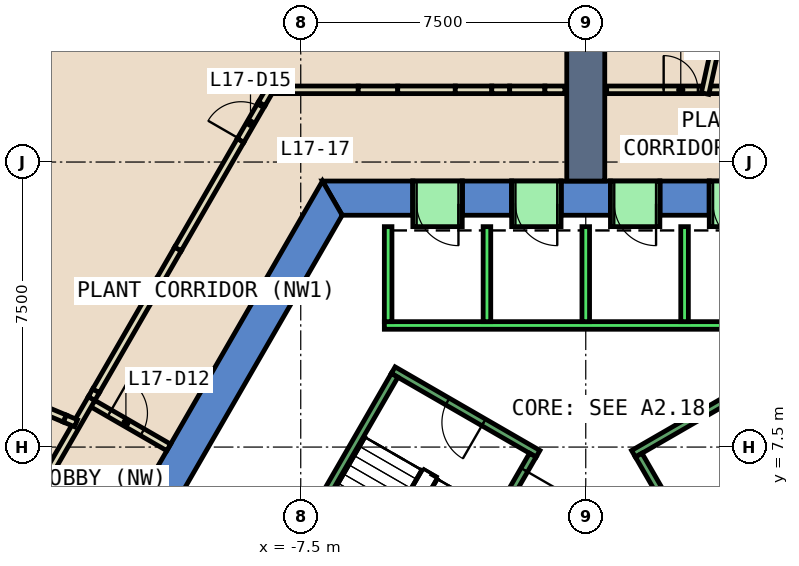
"""IFC4 building model, lengths in metres.
Left out: names, types, materials, properties, quantities, classifications, styles, units other than length and angle.
Written with IfcOpenShell. Run it as: python <this file> out.ifc"""

import sys

from ifc_helpers import new_model, si_unit, direction, frame, frame_2d, origin, place, context, subcontext, project, spatial, polyline, rectangle, outline, extrude, element, fill, save


model = new_model("IFC4")
c1 = context("Model", 3, precision=1e-05, world=origin(), true_north=direction((0.0, 1.0)))
c2 = subcontext(c1, "Body", "Model", "MODEL_VIEW")
j1 = project(units=[si_unit("LENGTHUNIT", "METRE"), si_unit("PLANEANGLEUNIT", "RADIAN")], contexts=[c1])
p1 = place(None, origin())
s1 = spatial("IfcSite", under=j1, at=p1, CompositionType="ELEMENT")
p2 = place(p1, origin())
s2 = spatial("IfcBuilding", under=s1, at=p2, CompositionType="ELEMENT")
p3 = place(p2, frame((0.0, 0.0, 81.2)))
s3 = spatial("IfcBuildingStorey", under=s2, at=p3, CompositionType="ELEMENT", Elevation=81.2)
p4 = place(p3, frame((0.0, 0.0, -0.6)))
e1 = element("IfcWall", 1, at=p4, inside=s3, PredefinedType="SHEAR", context=c2, shape_type="SweptSolid", body=[
    extrude(outline(polyline([(1.95, 14.5), (1.95, 13.6), (3.25, 13.6), (3.25, 14.5), (1.95, 14.5)])), origin(), (0.0, 0.0, 1.0), 5.4),
])
p5 = place(p3, frame((0.0, 0.0, -0.6)))
e2 = element("IfcWall", 2, at=p5, inside=s3, PredefinedType="SHEAR", context=c2, shape_type="SweptSolid", body=[
    extrude(outline(polyline([(-0.65, 14.5), (-0.65, 13.6), (0.65, 13.6), (0.65, 14.5), (-0.65, 14.5)])), origin(), (0.0, 0.0, 1.0), 5.4),
])
p6 = place(p3, frame((0.0, 0.0, -0.6)))
e3 = element("IfcWall", 3, at=p6, inside=s3, PredefinedType="SHEAR", context=c2, shape_type="SweptSolid", body=[
    extrude(outline(polyline([(-3.25, 14.5), (-3.25, 13.6), (-1.95, 13.6), (-1.95, 14.5), (-3.25, 14.5)])), origin(), (0.0, 0.0, 1.0), 5.4),
])
p7 = place(p3, frame((0.0, 0.0, -0.6)))
e4 = element("IfcWall", 4, at=p7, inside=s3, PredefinedType="SHEAR", context=c2, shape_type="SweptSolid", body=[
    extrude(outline(polyline([(-4.55, 13.6), (-4.55, 14.5), (-6.928, 14.5), (-6.409, 13.6), (-4.55, 13.6)])), origin(), (0.0, 0.0, 1.0), 5.4),
])
p8 = place(p3, frame((0.0, 0.0, 3.6)))
e5 = element("IfcWall", 5, at=p8, inside=s3, PredefinedType="SHEAR", context=c2, shape_type="SweptSolid", body=[
    extrude(outline(polyline([(3.25, 14.5), (3.25, 13.6), (4.55, 13.6), (4.55, 14.5), (3.25, 14.5)])), origin(), (0.0, 0.0, 1.0), 1.2),
])
p9 = place(p3, frame((0.0, 0.0, 3.6)))
e6 = element("IfcWall", 6, at=p9, inside=s3, PredefinedType="SHEAR", context=c2, shape_type="SweptSolid", body=[
    extrude(outline(polyline([(0.65, 14.5), (0.65, 13.6), (1.95, 13.6), (1.95, 14.5), (0.65, 14.5)])), origin(), (0.0, 0.0, 1.0), 1.2),
])
p10 = place(p3, frame((0.0, 0.0, 3.6)))
e7 = element("IfcWall", 7, at=p10, inside=s3, PredefinedType="SHEAR", context=c2, shape_type="SweptSolid", body=[
    extrude(outline(polyline([(-1.95, 14.5), (-1.95, 13.6), (-0.65, 13.6), (-0.65, 14.5), (-1.95, 14.5)])), origin(), (0.0, 0.0, 1.0), 1.2),
])
p11 = place(p3, frame((0.0, 0.0, 3.6)))
e8 = element("IfcWall", 8, at=p11, inside=s3, PredefinedType="SHEAR", context=c2, shape_type="SweptSolid", body=[
    extrude(outline(polyline([(-4.55, 14.5), (-4.55, 13.6), (-3.25, 13.6), (-3.25, 14.5), (-4.55, 14.5)])), origin(), (0.0, 0.0, 1.0), 1.2),
])
p12 = place(p3, frame((0.0, 0.0, -0.6)))
e9 = element("IfcWall", 9, at=p12, inside=s3, PredefinedType="SHEAR", context=c2, shape_type="SweptSolid", body=[
    extrude(outline(polyline([(-12.267, 5.252), (-11.488, 4.802), (-6.409, 13.6), (-6.928, 14.5), (-12.267, 5.252)])), origin(), (0.0, 0.0, 1.0), 5.4),
])
p13 = place(p3, frame((0.0, 14.5, 0.0), z_axis=(0.0, 0.0, 1.0), x_axis=(0.0, 1.0, 0.0)))
e10 = element("IfcWall", 10, at=p13, inside=s3, PredefinedType="SHEAR", context=c2, shape_type="SweptSolid", body=[
    extrude(rectangle(XDim=32.052, YDim=1.0, at=frame_2d((16.026, 0.0))), origin(), (0.0, 0.0, 1.0), 4.8),
])
p14 = place(p3, frame((3.26, 16.9, 0.0), z_axis=(0.0, 0.0, 1.0), x_axis=(1.0, 0.0, 0.0)))
e11 = element("IfcWall", 11, at=p14, inside=s3, PredefinedType="PARTITIONING", context=c2, shape_type="SweptSolid", body=[
    extrude(rectangle(XDim=3.281, YDim=0.2, at=frame_2d((1.641, 0.0))), origin(), (0.0, 0.0, 1.0), 4.8),
])
p15 = place(p14, frame((1.103, 0.0, 0.0)))
e12 = element("IfcOpeningElement", 12, at=p15, cuts=e11, PredefinedType="OPENING", context=c2, shape_type="SweptSolid", body=[
    extrude(rectangle(XDim=1.0, YDim=2.1, at=frame_2d((0.5, 1.05))), frame((0.0, 0.11, 0.0), z_axis=(0.0, -1.0, 0.0), x_axis=(1.0, 0.0, 0.0)), (0.0, 0.0, 1.0), 0.22),
])
p16 = place(p3, frame((0.55, 16.9, 0.0), z_axis=(0.0, 0.0, 1.0), x_axis=(1.0, 0.0, 0.0)))
e13 = element("IfcWall", 13, at=p16, inside=s3, PredefinedType="PARTITIONING", context=c2, shape_type="SweptSolid", body=[
    extrude(rectangle(XDim=2.51, YDim=0.2, at=frame_2d((1.255, 0.0))), origin(), (0.0, 0.0, 1.0), 4.8),
])
p17 = place(p16, frame((1.5, 0.0, 0.0)))
e14 = element("IfcOpeningElement", 14, at=p17, cuts=e13, PredefinedType="OPENING", context=c2, shape_type="SweptSolid", body=[
    extrude(rectangle(XDim=0.9, YDim=2.1, at=frame_2d((0.45, 1.05))), frame((0.0, 0.11, 0.0), z_axis=(0.0, -1.0, 0.0), x_axis=(1.0, 0.0, 0.0)), (0.0, 0.0, 1.0), 0.22),
])
p18 = place(p3, frame((3.139, 16.802, 0.0), z_axis=(0.0, 0.0, 1.0), x_axis=(0.214360085787, 0.97675470494, 0.0)))
e15 = element("IfcWall", 15, at=p18, inside=s3, PredefinedType="PARTITIONING", context=c2, shape_type="SweptSolid", body=[
    extrude(rectangle(XDim=25.271, YDim=0.2, at=frame_2d((12.635, 0.0))), origin(), (0.0, 0.0, 1.0), 2.3),
])
p19 = place(p3, frame((-13.053, 8.691, 0.0), z_axis=(0.0, 0.0, 1.0), x_axis=(0.865973769406, -0.500089422704, 0.0)))
e16 = element("IfcWall", 16, at=p19, inside=s3, PredefinedType="PARTITIONING", context=c2, shape_type="SweptSolid", body=[
    extrude(rectangle(XDim=2.399, YDim=0.2, at=frame_2d((1.2, 0.0))), origin(), (0.0, 0.0, 1.0), 2.4),
])
p20 = place(p19, frame((0.6, 0.0, 0.0)))
e17 = element("IfcOpeningElement", 17, at=p20, cuts=e16, PredefinedType="OPENING", context=c2, shape_type="SweptSolid", body=[
    extrude(rectangle(XDim=1.0, YDim=2.1, at=frame_2d((0.5, 1.05))), frame((0.0, 0.11, 0.0), z_axis=(0.0, -1.0, 0.0), x_axis=(1.0, 0.0, 0.0)), (0.0, 0.0, 1.0), 0.22),
])
p21 = place(p3, frame((-16.603, 2.542, 0.0), z_axis=(0.0, 0.0, 1.0), x_axis=(0.499968011863, 0.866043871356, 0.0)))
e18 = element("IfcWall", 18, at=p21, inside=s3, PredefinedType="PARTITIONING", context=c2, shape_type="SweptSolid", body=[
    extrude(rectangle(XDim=7.201, YDim=0.2, at=frame_2d((3.6, 0.0))), origin(), (0.0, 0.0, 1.0), 4.8),
])
p22 = place(p21, frame((2.654, 0.0, 0.0)))
e19 = element("IfcOpeningElement", 19, at=p22, cuts=e18, PredefinedType="OPENING", context=c2, shape_type="SweptSolid", body=[
    extrude(rectangle(XDim=1.0, YDim=2.1, at=frame_2d((0.5, 1.05))), frame((0.0, 0.11, 0.0), z_axis=(0.0, -1.0, 0.0), x_axis=(1.0, 0.0, 0.0)), (0.0, 0.0, 1.0), 0.22),
])
p23 = place(p3, frame((-13.003, 8.778, 0.0), z_axis=(0.0, 0.0, 1.0), x_axis=(0.49939147885, 0.866376448694, 0.0)))
e20 = element("IfcWall", 20, at=p23, inside=s3, PredefinedType="PARTITIONING", context=c2, shape_type="SweptSolid", body=[
    extrude(rectangle(XDim=0.234, YDim=0.2, at=frame_2d((0.117, 0.0))), origin(), (0.0, 0.0, 1.0), 2.4),
])
p24 = place(p3, frame((-8.214, 16.9, 0.0), z_axis=(0.0, 0.0, 1.0), x_axis=(1.0, 0.0, 0.0)))
e21 = element("IfcWall", 21, at=p24, inside=s3, PredefinedType="PARTITIONING", context=c2, shape_type="SweptSolid", body=[
    extrude(rectangle(XDim=2.227, YDim=0.2, at=frame_2d((1.114, 0.0))), origin(), (0.0, 0.0, 1.0), 4.8),
])
p25 = place(p3, frame((-12.886, 8.981, 0.0), z_axis=(0.0, 0.0, 1.0), x_axis=(0.500018952895, 0.866014461049, 0.0)))
e22 = element("IfcWall", 22, at=p25, inside=s3, PredefinedType="PARTITIONING", context=c2, shape_type="SweptSolid", body=[
    extrude(rectangle(XDim=3.35, YDim=0.2, at=frame_2d((1.675, 0.0))), origin(), (0.0, 0.0, 1.0), 4.8),
])
p26 = place(p3, frame((-11.211, 11.882, 0.0), z_axis=(0.0, 0.0, 1.0), x_axis=(0.499693115345, 0.866202511239, 0.0)))
e23 = element("IfcWall", 23, at=p26, inside=s3, PredefinedType="PARTITIONING", context=c2, shape_type="SweptSolid", body=[
    extrude(rectangle(XDim=0.96, YDim=0.2, at=frame_2d((0.48, 0.0))), origin(), (0.0, 0.0, 1.0), 2.4),
])
p27 = place(p3, frame((-10.731, 12.714, 0.0), z_axis=(0.0, 0.0, 1.0), x_axis=(0.500043078269, 0.866000531106, 0.0)))
e24 = element("IfcWall", 24, at=p27, inside=s3, PredefinedType="PARTITIONING", context=c2, shape_type="SweptSolid", body=[
    extrude(rectangle(XDim=3.296, YDim=0.2, at=frame_2d((1.648, 0.0))), origin(), (0.0, 0.0, 1.0), 4.8),
])
p28 = place(p3, frame((-9.083, 15.568, 0.0), z_axis=(0.0, 0.0, 1.0), x_axis=(0.499988560547, 0.866032008255, 0.0)))
e25 = element("IfcWall", 25, at=p28, inside=s3, PredefinedType="PARTITIONING", context=c2, shape_type="SweptSolid", body=[
    extrude(rectangle(XDim=1.112, YDim=0.2, at=frame_2d((0.556, 0.0))), origin(), (0.0, 0.0, 1.0), 2.4),
])
p29 = place(p28, frame((0.022, 0.0, 0.0)))
e26 = element("IfcOpeningElement", 26, at=p29, cuts=e25, PredefinedType="OPENING", context=c2, shape_type="SweptSolid", body=[
    extrude(rectangle(XDim=1.0, YDim=2.1, at=frame_2d((0.5, 1.05))), frame((0.0, 0.11, 0.0), z_axis=(0.0, -1.0, 0.0), x_axis=(1.0, 0.0, 0.0)), (0.0, 0.0, 1.0), 0.22),
])
p30 = place(p3, frame((-8.527, 16.531, 0.0), z_axis=(0.0, 0.0, 1.0), x_axis=(0.499829488579, 0.86612382622, 0.0)))
e27 = element("IfcWall", 27, at=p30, inside=s3, PredefinedType="PARTITIONING", context=c2, shape_type="SweptSolid", body=[
    extrude(rectangle(XDim=0.527, YDim=0.2, at=frame_2d((0.263, 0.0))), origin(), (0.0, 0.0, 1.0), 4.8),
])
p31 = place(p3, frame((-5.987, 16.9, 0.0), z_axis=(0.0, 0.0, 1.0), x_axis=(1.0, 0.0, 0.0)))
e28 = element("IfcWall", 28, at=p31, inside=s3, PredefinedType="PARTITIONING", context=c2, shape_type="SweptSolid", body=[
    extrude(rectangle(XDim=1.039, YDim=0.2, at=frame_2d((0.52, 0.0))), origin(), (0.0, 0.0, 1.0), 2.4),
])
p32 = place(p3, frame((-4.948, 16.9, 0.0), z_axis=(0.0, 0.0, 1.0), x_axis=(1.0, 0.0, 0.0)))
e29 = element("IfcWall", 29, at=p32, inside=s3, PredefinedType="PARTITIONING", context=c2, shape_type="SweptSolid", body=[
    extrude(rectangle(XDim=1.515, YDim=0.2, at=frame_2d((0.757, 0.0))), origin(), (0.0, 0.0, 1.0), 4.8),
])
p33 = place(p3, frame((-3.433, 16.9, 0.0), z_axis=(0.0, 0.0, 1.0), x_axis=(1.0, 0.0, 0.0)))
e30 = element("IfcWall", 30, at=p33, inside=s3, PredefinedType="PARTITIONING", context=c2, shape_type="SweptSolid", body=[
    extrude(rectangle(XDim=0.96, YDim=0.2, at=frame_2d((0.48, 0.0))), origin(), (0.0, 0.0, 1.0), 2.3),
])
p34 = place(p3, frame((-2.473, 16.9, 0.0), z_axis=(0.0, 0.0, 1.0), x_axis=(1.0, 0.0, 0.0)))
e31 = element("IfcWall", 31, at=p34, inside=s3, PredefinedType="PARTITIONING", context=c2, shape_type="SweptSolid", body=[
    extrude(rectangle(XDim=0.471, YDim=0.2, at=frame_2d((0.235, 0.0))), origin(), (0.0, 0.0, 1.0), 4.8),
])
p35 = place(p3, frame((-2.002, 16.9, 0.0), z_axis=(0.0, 0.0, 1.0), x_axis=(1.0, 0.0, 0.0)))
e32 = element("IfcWall", 32, at=p35, inside=s3, PredefinedType="PARTITIONING", context=c2, shape_type="SweptSolid", body=[
    extrude(rectangle(XDim=0.927, YDim=0.2, at=frame_2d((0.463, 0.0))), origin(), (0.0, 0.0, 1.0), 2.0),
])
p36 = place(p3, frame((-1.075, 16.9, 0.0), z_axis=(0.0, 0.0, 1.0), x_axis=(1.0, 0.0, 0.0)))
e33 = element("IfcWall", 33, at=p36, inside=s3, PredefinedType="PARTITIONING", context=c2, shape_type="SweptSolid", body=[
    extrude(rectangle(XDim=0.525, YDim=0.2, at=frame_2d((0.262, 0.0))), origin(), (0.0, 0.0, 1.0), 4.8),
])
p37 = place(p3, frame((-25.73, 13.293, 0.0), z_axis=(0.0, 0.0, 1.0), x_axis=(0.922164650021, -0.386797567535, 0.0)))
e34 = element("IfcWall", 34, at=p37, inside=s3, PredefinedType="PARTITIONING", context=c2, shape_type="SweptSolid", body=[
    extrude(rectangle(XDim=13.038, YDim=0.2, at=frame_2d((6.519, 0.0))), origin(), (0.0, 0.0, 1.0), 4.8),
])
p38 = place(p3, frame((-13.707, 8.25, 0.0), z_axis=(0.0, 0.0, 1.0), x_axis=(0.921982105607, -0.387232484355, 0.0)))
e35 = element("IfcWall", 35, at=p38, inside=s3, PredefinedType="PARTITIONING", context=c2, shape_type="SweptSolid", body=[
    extrude(rectangle(XDim=0.318, YDim=0.2, at=frame_2d((0.159, 0.0))), origin(), (0.0, 0.0, 1.0), 2.4),
])
p39 = place(p3, frame((5.3, 10.7, 0.0), z_axis=(0.0, 0.0, 1.0), x_axis=(-1.0, 0.0, 0.0)))
e36 = element("IfcWall", 36, at=p39, inside=s3, PredefinedType="STANDARD", context=c2, shape_type="SweptSolid", body=[
    extrude(rectangle(XDim=10.6, YDim=0.2, at=frame_2d((5.3, 0.0))), origin(), (0.0, 0.0, 1.0), 4.8),
])
for number, where, z_axis, x_axis in (
    (37, (2.6, 10.8, 0.0), (0.0, 0.0, 1.0), (0.0, 1.0, 0.0)),
    (38, (0.0, 10.8, 0.0), (0.0, 0.0, 1.0), (0.0, 1.0, 0.0)),
    (39, (-2.6, 10.8, 0.0), (0.0, 0.0, 1.0), (0.0, 1.0, 0.0)),
    (40, (-5.2, 10.8, 0.0), (0.0, 0.0, 1.0), (0.0, 1.0, 0.0)),
):
    element("IfcWall", number, at=place(p3, frame(where, z_axis=z_axis, x_axis=x_axis)), inside=s3, PredefinedType="STANDARD", context=c2, shape_type="SweptSolid", body=[
        extrude(rectangle(XDim=2.5, YDim=0.2, at=frame_2d((1.25, 0.0))), origin(), (0.0, 0.0, 1.0), 4.8),
    ])
p40 = place(p3, frame((4.55, 13.9, 0.0), z_axis=(0.0, 0.0, 1.0), x_axis=(-1.0, 0.0, 0.0)))
e41 = element("IfcWall", 41, at=p40, inside=s3, PredefinedType="STANDARD", context=c2, shape_type="SweptSolid", body=[
    extrude(rectangle(XDim=1.3, YDim=1.2, at=frame_2d((0.65, 0.0))), origin(), (0.0, 0.0, 1.0), 2.4),
])
p41 = place(p40, frame((0.1, 0.0, 0.0)))
e42 = element("IfcOpeningElement", 42, at=p41, cuts=e41, PredefinedType="OPENING", context=c2, shape_type="SweptSolid", body=[
    extrude(rectangle(XDim=1.1, YDim=2.3, at=frame_2d((0.55, 1.15))), frame((0.0, 0.61, 0.0), z_axis=(0.0, -1.0, 0.0), x_axis=(1.0, 0.0, 0.0)), (0.0, 0.0, 1.0), 1.22),
])
p42 = place(p3, frame((1.95, 13.9, 0.0), z_axis=(0.0, 0.0, 1.0), x_axis=(-1.0, 0.0, 0.0)))
e43 = element("IfcWall", 43, at=p42, inside=s3, PredefinedType="STANDARD", context=c2, shape_type="SweptSolid", body=[
    extrude(rectangle(XDim=1.3, YDim=1.2, at=frame_2d((0.65, 0.0))), origin(), (0.0, 0.0, 1.0), 2.4),
])
p43 = place(p42, frame((0.1, 0.0, 0.0)))
e44 = element("IfcOpeningElement", 44, at=p43, cuts=e43, PredefinedType="OPENING", context=c2, shape_type="SweptSolid", body=[
    extrude(rectangle(XDim=1.1, YDim=2.3, at=frame_2d((0.55, 1.15))), frame((0.0, 0.61, 0.0), z_axis=(0.0, -1.0, 0.0), x_axis=(1.0, 0.0, 0.0)), (0.0, 0.0, 1.0), 1.22),
])
p44 = place(p3, frame((-0.65, 13.9, 0.0), z_axis=(0.0, 0.0, 1.0), x_axis=(-1.0, 0.0, 0.0)))
e45 = element("IfcWall", 45, at=p44, inside=s3, PredefinedType="STANDARD", context=c2, shape_type="SweptSolid", body=[
    extrude(rectangle(XDim=1.3, YDim=1.2, at=frame_2d((0.65, 0.0))), origin(), (0.0, 0.0, 1.0), 2.4),
])
p45 = place(p44, frame((0.1, 0.0, 0.0)))
e46 = element("IfcOpeningElement", 46, at=p45, cuts=e45, PredefinedType="OPENING", context=c2, shape_type="SweptSolid", body=[
    extrude(rectangle(XDim=1.1, YDim=2.3, at=frame_2d((0.55, 1.15))), frame((0.0, 0.61, 0.0), z_axis=(0.0, -1.0, 0.0), x_axis=(1.0, 0.0, 0.0)), (0.0, 0.0, 1.0), 1.22),
])
p46 = place(p3, frame((-3.25, 13.9, 0.0), z_axis=(0.0, 0.0, 1.0), x_axis=(-1.0, 0.0, 0.0)))
e47 = element("IfcWall", 47, at=p46, inside=s3, PredefinedType="STANDARD", context=c2, shape_type="SweptSolid", body=[
    extrude(rectangle(XDim=1.3, YDim=1.2, at=frame_2d((0.65, 0.0))), origin(), (0.0, 0.0, 1.0), 2.4),
])
p47 = place(p46, frame((0.1, 0.0, 0.0)))
e48 = element("IfcOpeningElement", 48, at=p47, cuts=e47, PredefinedType="OPENING", context=c2, shape_type="SweptSolid", body=[
    extrude(rectangle(XDim=1.1, YDim=2.3, at=frame_2d((0.55, 1.15))), frame((0.0, 0.61, 0.0), z_axis=(0.0, -1.0, 0.0), x_axis=(1.0, 0.0, 0.0)), (0.0, 0.0, 1.0), 1.22),
])
p48 = place(p3, frame((1.256, 7.324, 0.0), z_axis=(0.0, 0.0, 1.0), x_axis=(0.866046073146, 0.499964197906, 0.0)))
e49 = element("IfcWall", 49, at=p48, inside=s3, PredefinedType="STANDARD", context=c2, shape_type="SweptSolid", body=[
    extrude(rectangle(XDim=4.4, YDim=0.2, at=frame_2d((2.2, 0.0))), origin(), (0.0, 0.0, 1.0), 4.8),
])
p49 = place(p3, frame((4.843, 1.312, 0.0), z_axis=(0.0, 0.0, 1.0), x_axis=(-0.499963383562, 0.866046543262, 0.0)))
e50 = element("IfcWall", 50, at=p49, inside=s3, PredefinedType="STANDARD", context=c2, shape_type="SweptSolid", body=[
    extrude(rectangle(XDim=6.9, YDim=0.2, at=frame_2d((3.45, 0.0))), origin(), (0.0, 0.0, 1.0), 4.8),
])
p50 = place(p49, frame((0.45, 0.0, 0.0)))
e51 = element("IfcOpeningElement", 51, at=p50, cuts=e50, PredefinedType="OPENING", context=c2, shape_type="SweptSolid", body=[
    extrude(rectangle(XDim=1.1, YDim=2.2, at=frame_2d((0.55, 1.1))), frame((0.0, 0.11, 0.0), z_axis=(0.0, -1.0, 0.0), x_axis=(1.0, 0.0, 0.0)), (0.0, 0.0, 1.0), 0.22),
])
p51 = place(p3, frame((-1.256, 7.324, 0.0), z_axis=(0.0, 0.0, 1.0), x_axis=(-0.866046073146, 0.499964197906, 0.0)))
e52 = element("IfcWall", 52, at=p51, inside=s3, PredefinedType="STANDARD", context=c2, shape_type="SweptSolid", body=[
    extrude(rectangle(XDim=4.4, YDim=0.2, at=frame_2d((2.2, 0.0))), origin(), (0.0, 0.0, 1.0), 4.8),
])
p52 = place(p51, frame((1.65, 0.0, 0.0)))
e53 = element("IfcOpeningElement", 53, at=p52, cuts=e52, PredefinedType="OPENING", context=c2, shape_type="SweptSolid", body=[
    extrude(rectangle(XDim=1.1, YDim=2.2, at=frame_2d((0.55, 1.1))), frame((0.0, 0.11, 0.0), z_axis=(0.0, -1.0, 0.0), x_axis=(1.0, 0.0, 0.0)), (0.0, 0.0, 1.0), 0.22),
])
p53 = place(p3, frame((-1.393, 7.288, 0.0), z_axis=(0.0, 0.0, 1.0), x_axis=(-0.499963383562, -0.866046543262, 0.0)))
e54 = element("IfcWall", 54, at=p53, inside=s3, PredefinedType="STANDARD", context=c2, shape_type="SweptSolid", body=[
    extrude(rectangle(XDim=6.9, YDim=0.2, at=frame_2d((3.45, 0.0))), origin(), (0.0, 0.0, 1.0), 4.8),
])
p54 = place(p53, frame((0.45, 0.0, 0.0)))
e55 = element("IfcOpeningElement", 55, at=p54, cuts=e54, PredefinedType="OPENING", context=c2, shape_type="SweptSolid", body=[
    extrude(rectangle(XDim=1.1, YDim=2.2, at=frame_2d((0.55, 1.1))), frame((0.0, 0.11, 0.0), z_axis=(0.0, -1.0, 0.0), x_axis=(1.0, 0.0, 0.0)), (0.0, 0.0, 1.0), 0.22),
])
p55 = place(p3, frame((-5.03, 9.388, 0.0), z_axis=(0.0, 0.0, 1.0), x_axis=(-0.499978703459, -0.866037698999, 0.0)))
e56 = element("IfcWall", 56, at=p55, inside=s3, PredefinedType="STANDARD", context=c2, shape_type="SweptSolid", body=[
    extrude(rectangle(XDim=6.9, YDim=0.2, at=frame_2d((3.45, 0.0))), origin(), (0.0, 0.0, 1.0), 4.8),
])
p56 = place(p17, origin())
e57 = element("IfcDoor", 57, at=p56, inside=s3, OperationType="SINGLE_SWING_LEFT", PredefinedType="DOOR", context=c2, shape_type="SweptSolid", body=[
    extrude(rectangle(XDim=0.9, YDim=2.1, at=frame_2d((0.45, 1.05))), frame((0.0, 0.025, 0.0), z_axis=(0.0, -1.0, 0.0), x_axis=(1.0, 0.0, 0.0)), (0.0, 0.0, 1.0), 0.05),
])
fill(e14, e57)
p57 = place(p20, origin())
e58 = element("IfcDoor", 58, at=p57, inside=s3, OperationType="SINGLE_SWING_RIGHT", PredefinedType="DOOR", context=c2, shape_type="SweptSolid", body=[
    extrude(rectangle(XDim=1.0, YDim=2.1, at=frame_2d((0.5, 1.05))), frame((0.0, 0.025, 0.0), z_axis=(0.0, -1.0, 0.0), x_axis=(1.0, 0.0, 0.0)), (0.0, 0.0, 1.0), 0.05),
])
fill(e17, e58)
p58 = place(p29, origin())
e59 = element("IfcDoor", 59, at=p58, inside=s3, OperationType="SINGLE_SWING_LEFT", PredefinedType="DOOR", context=c2, shape_type="SweptSolid", body=[
    extrude(rectangle(XDim=1.0, YDim=2.1, at=frame_2d((0.5, 1.05))), frame((0.0, 0.025, 0.0), z_axis=(0.0, -1.0, 0.0), x_axis=(1.0, 0.0, 0.0)), (0.0, 0.0, 1.0), 0.05),
])
fill(e26, e59)
p59 = place(p41, origin())
e60 = element("IfcDoor", 60, at=p59, inside=s3, OperationType="SLIDING_TO_LEFT", PredefinedType="DOOR", context=c2, shape_type="SweptSolid", body=[
    extrude(rectangle(XDim=1.1, YDim=2.3, at=frame_2d((0.55, 1.15))), frame((0.0, 0.025, 0.0), z_axis=(0.0, -1.0, 0.0), x_axis=(1.0, 0.0, 0.0)), (0.0, 0.0, 1.0), 0.05),
])
fill(e42, e60)
p60 = place(p43, origin())
e61 = element("IfcDoor", 61, at=p60, inside=s3, OperationType="SLIDING_TO_LEFT", PredefinedType="DOOR", context=c2, shape_type="SweptSolid", body=[
    extrude(rectangle(XDim=1.1, YDim=2.3, at=frame_2d((0.55, 1.15))), frame((0.0, 0.025, 0.0), z_axis=(0.0, -1.0, 0.0), x_axis=(1.0, 0.0, 0.0)), (0.0, 0.0, 1.0), 0.05),
])
fill(e44, e61)
p61 = place(p45, origin())
e62 = element("IfcDoor", 62, at=p61, inside=s3, OperationType="SLIDING_TO_LEFT", PredefinedType="DOOR", context=c2, shape_type="SweptSolid", body=[
    extrude(rectangle(XDim=1.1, YDim=2.3, at=frame_2d((0.55, 1.15))), frame((0.0, 0.025, 0.0), z_axis=(0.0, -1.0, 0.0), x_axis=(1.0, 0.0, 0.0)), (0.0, 0.0, 1.0), 0.05),
])
fill(e46, e62)
p62 = place(p47, origin())
e63 = element("IfcDoor", 63, at=p62, inside=s3, OperationType="SLIDING_TO_LEFT", PredefinedType="DOOR", context=c2, shape_type="SweptSolid", body=[
    extrude(rectangle(XDim=1.1, YDim=2.3, at=frame_2d((0.55, 1.15))), frame((0.0, 0.025, 0.0), z_axis=(0.0, -1.0, 0.0), x_axis=(1.0, 0.0, 0.0)), (0.0, 0.0, 1.0), 0.05),
])
fill(e48, e63)
p63 = place(p54, origin())
e64 = element("IfcDoor", 64, at=p63, inside=s3, OperationType="SINGLE_SWING_LEFT", PredefinedType="DOOR", context=c2, shape_type="SweptSolid", body=[
    extrude(rectangle(XDim=1.1, YDim=2.2, at=frame_2d((0.55, 1.1))), frame((0.0, 0.025, 0.0), z_axis=(0.0, -1.0, 0.0), x_axis=(1.0, 0.0, 0.0)), (0.0, 0.0, 1.0), 0.05),
])
fill(e55, e64)
p64 = place(p52, origin())
e65 = element("IfcDoor", 65, at=p64, inside=s3, OperationType="SINGLE_SWING_LEFT", PredefinedType="DOOR", context=c2, shape_type="SweptSolid", body=[
    extrude(rectangle(XDim=1.1, YDim=2.2, at=frame_2d((0.55, 1.1))), frame((0.0, 0.025, 0.0), z_axis=(0.0, -1.0, 0.0), x_axis=(1.0, 0.0, 0.0)), (0.0, 0.0, 1.0), 0.05),
])
fill(e53, e65)
save(model, sys.argv[1])
